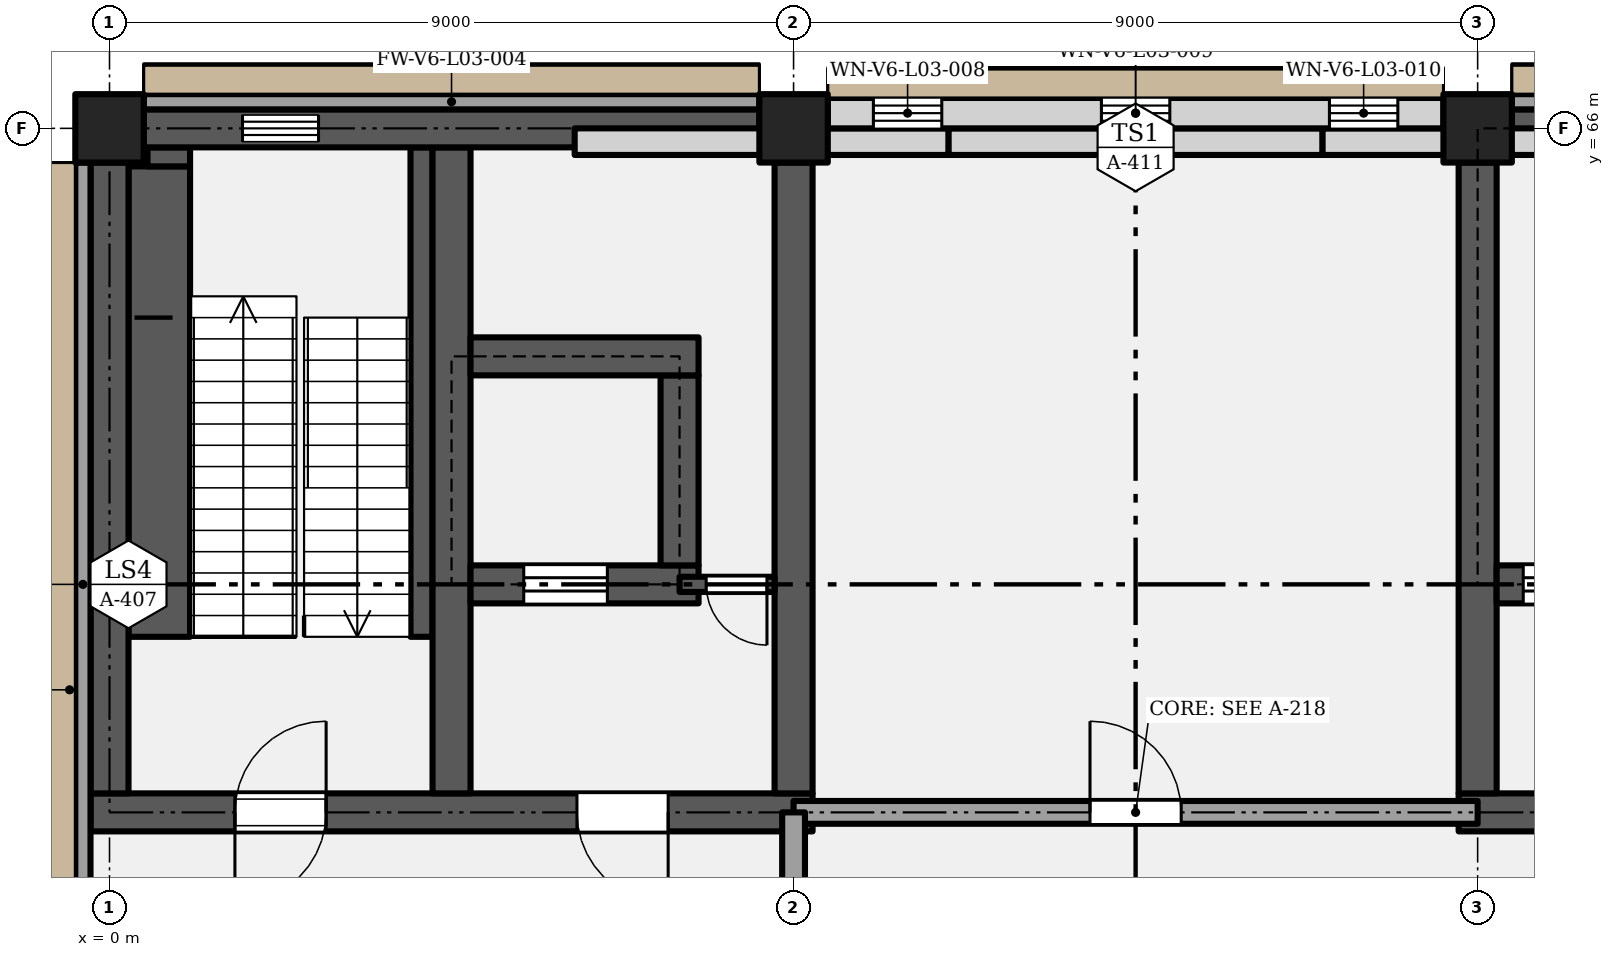
"""IFC4 building model, lengths in metres.
Left out: names, types, materials, properties, quantities, classifications, styles, units other than length and angle.
Written with IfcOpenShell. Run it as: python <this file> out.ifc"""

import sys

from ifc_helpers import new_model, si_unit, direction, frame, frame_2d, origin, origin_2d, place, context, subcontext, project, spatial, rectangle, extrude, element, fill, save


model = new_model("IFC4")
c1 = context("Model", 3, precision=1e-05, world=origin(), true_north=direction((0.0, 1.0)))
c2 = subcontext(c1, "Body", "Model", "MODEL_VIEW")
j1 = project(units=[si_unit("LENGTHUNIT", "METRE"), si_unit("PLANEANGLEUNIT", "RADIAN")], contexts=[c1])
p1 = place(None, origin())
s1 = spatial("IfcSite", under=j1, at=p1, CompositionType="ELEMENT")
p2 = place(p1, origin())
s2 = spatial("IfcBuilding", under=s1, at=p2, CompositionType="ELEMENT")
p3 = place(p2, frame((0.0, 0.0, 17.4)))
s3 = spatial("IfcBuildingStorey", under=s2, at=p3, CompositionType="ELEMENT", Elevation=17.4)
for number, where, z_axis, x_axis in (
    (1, (0.0, 66.0, 0.0), (0.0, 0.0, 1.0), (1.0, 0.0, 0.0)),
    (2, (9.0, 66.0, 0.0), (0.0, 0.0, 1.0), (1.0, 0.0, 0.0)),
    (3, (18.0, 66.0, 0.0), (0.0, 0.0, 1.0), (1.0, 0.0, 0.0)),
):
    element("IfcColumn", number, at=place(p3, frame(where, z_axis=z_axis, x_axis=x_axis)), inside=s3, PredefinedType="COLUMN", context=c2, shape_type="SweptSolid", body=[
        extrude(rectangle(XDim=0.9, YDim=0.9, at=origin_2d()), origin(), (0.0, 0.0, 1.0), 5.4),
    ])
p4 = place(p3, frame((-0.25, 57.0, 0.0), z_axis=(0.0, 0.0, 1.0), x_axis=(1.0, 0.0, 0.0)))
e4 = element("IfcWall", 4, at=p4, inside=s3, PredefinedType="SHEAR", context=c2, shape_type="SweptSolid", body=[
    extrude(rectangle(XDim=9.5, YDim=0.5, at=frame_2d((4.75, 0.0))), origin(), (0.0, 0.0, 1.0), 5.15),
])
p5 = place(p4, frame((1.9, 0.0, 0.0)))
e5 = element("IfcOpeningElement", 5, at=p5, cuts=e4, PredefinedType="OPENING", context=c2, shape_type="SweptSolid", body=[
    extrude(rectangle(XDim=1.2, YDim=2.1, at=frame_2d((0.6, 1.05))), frame((0.0, 0.26, 0.0), z_axis=(0.0, -1.0, 0.0), x_axis=(1.0, 0.0, 0.0)), (0.0, 0.0, 1.0), 0.52),
])
p6 = place(p4, frame((7.6, 0.0, 0.0), z_axis=(0.0, 0.0, 1.0), x_axis=(-1.0, 0.0, 0.0)))
e6 = element("IfcOpeningElement", 6, at=p6, cuts=e4, PredefinedType="OPENING", context=c2, shape_type="SweptSolid", body=[
    extrude(rectangle(XDim=1.2, YDim=2.1, at=frame_2d((0.6, 1.05))), frame((0.0, 0.26, 0.0), z_axis=(0.0, -1.0, 0.0), x_axis=(1.0, 0.0, 0.0)), (0.0, 0.0, 1.0), 0.52),
])
p7 = place(p3, frame((17.75, 57.0, 0.0), z_axis=(0.0, 0.0, 1.0), x_axis=(1.0, 0.0, 0.0)))
e7 = element("IfcWall", 7, at=p7, inside=s3, PredefinedType="SHEAR", context=c2, shape_type="SweptSolid", body=[
    extrude(rectangle(XDim=9.5, YDim=0.5, at=frame_2d((4.75, 0.0))), origin(), (0.0, 0.0, 1.0), 5.15),
])
p8 = place(p7, frame((3.1, 0.0, 0.0), z_axis=(0.0, 0.0, 1.0), x_axis=(-1.0, 0.0, 0.0)))
e8 = element("IfcOpeningElement", 8, at=p8, cuts=e7, PredefinedType="OPENING", context=c2, shape_type="SweptSolid", body=[
    extrude(rectangle(XDim=1.2, YDim=2.1, at=frame_2d((0.6, 1.05))), frame((0.0, 0.26, 0.0), z_axis=(0.0, -1.0, 0.0), x_axis=(1.0, 0.0, 0.0)), (0.0, 0.0, 1.0), 0.52),
])
p9 = place(p7, frame((6.4, 0.0, 0.0)))
e9 = element("IfcOpeningElement", 9, at=p9, cuts=e7, PredefinedType="OPENING", context=c2, shape_type="SweptSolid", body=[
    extrude(rectangle(XDim=1.2, YDim=2.1, at=frame_2d((0.6, 1.05))), frame((0.0, 0.26, 0.0), z_axis=(0.0, -1.0, 0.0), x_axis=(1.0, 0.0, 0.0)), (0.0, 0.0, 1.0), 0.52),
])
p10 = place(p3, frame((0.0, 57.25, 0.0), z_axis=(0.0, 0.0, 1.0), x_axis=(0.0, 1.0, 0.0)))
e10 = element("IfcWall", 10, at=p10, inside=s3, PredefinedType="SHEAR", context=c2, shape_type="SweptSolid", body=[
    extrude(rectangle(XDim=8.3, YDim=0.5, at=frame_2d((4.15, 0.0))), origin(), (0.0, 0.0, 1.0), 5.15),
])
p11 = place(p3, frame((4.5, 57.25, 0.0), z_axis=(0.0, 0.0, 1.0), x_axis=(0.0, 1.0, 0.0)))
e11 = element("IfcWall", 11, at=p11, inside=s3, PredefinedType="SHEAR", context=c2, shape_type="SweptSolid", body=[
    extrude(rectangle(XDim=8.5, YDim=0.5, at=frame_2d((4.25, 0.0))), origin(), (0.0, 0.0, 1.0), 5.15),
])
for number, where, z_axis, x_axis in (
    (12, (9.0, 57.25, 0.0), (0.0, 0.0, 1.0), (0.0, 1.0, 0.0)),
    (13, (18.0, 57.25, 0.0), (0.0, 0.0, 1.0), (0.0, 1.0, 0.0)),
):
    element("IfcWall", number, at=place(p3, frame(where, z_axis=z_axis, x_axis=x_axis)), inside=s3, PredefinedType="SHEAR", context=c2, shape_type="SweptSolid", body=[
        extrude(rectangle(XDim=8.3, YDim=0.5, at=frame_2d((4.15, 0.0))), origin(), (0.0, 0.0, 1.0), 5.15),
    ])
p12 = place(p3, frame((4.75, 60.0, 0.0), z_axis=(0.0, 0.0, 1.0), x_axis=(1.0, 0.0, 0.0)))
e14 = element("IfcWall", 14, at=p12, inside=s3, PredefinedType="SHEAR", context=c2, shape_type="SweptSolid", body=[
    extrude(rectangle(XDim=3.0, YDim=0.5, at=frame_2d((1.5, 0.0))), origin(), (0.0, 0.0, 1.0), 5.15),
])
p13 = place(p12, frame((0.7, 0.0, 0.0)))
e15 = element("IfcOpeningElement", 15, at=p13, cuts=e14, PredefinedType="OPENING", context=c2, shape_type="SweptSolid", body=[
    extrude(rectangle(XDim=1.1, YDim=2.1, at=frame_2d((0.55, 1.05))), frame((0.0, 0.26, 0.0), z_axis=(0.0, -1.0, 0.0), x_axis=(1.0, 0.0, 0.0)), (0.0, 0.0, 1.0), 0.52),
])
p14 = place(p3, frame((18.25, 60.0, 0.0), z_axis=(0.0, 0.0, 1.0), x_axis=(1.0, 0.0, 0.0)))
e16 = element("IfcWall", 16, at=p14, inside=s3, PredefinedType="SHEAR", context=c2, shape_type="SweptSolid", body=[
    extrude(rectangle(XDim=4.0, YDim=0.5, at=frame_2d((2.0, 0.0))), origin(), (0.0, 0.0, 1.0), 5.15),
])
p15 = place(p14, frame((0.35, 0.0, 0.0)))
e17 = element("IfcOpeningElement", 17, at=p15, cuts=e16, PredefinedType="OPENING", context=c2, shape_type="SweptSolid", body=[
    extrude(rectangle(XDim=1.1, YDim=2.1, at=frame_2d((0.55, 1.05))), frame((0.0, 0.26, 0.0), z_axis=(0.0, -1.0, 0.0), x_axis=(1.0, 0.0, 0.0)), (0.0, 0.0, 1.0), 0.52),
])
p16 = place(p14, frame((2.5, 0.0, 0.0)))
e18 = element("IfcOpeningElement", 18, at=p16, cuts=e16, PredefinedType="OPENING", context=c2, shape_type="SweptSolid", body=[
    extrude(rectangle(XDim=1.1, YDim=2.1, at=frame_2d((0.55, 1.05))), frame((0.0, 0.26, 0.0), z_axis=(0.0, -1.0, 0.0), x_axis=(1.0, 0.0, 0.0)), (0.0, 0.0, 1.0), 0.52),
])
p17 = place(p3, frame((7.5, 60.25, 0.0), z_axis=(0.0, 0.0, 1.0), x_axis=(0.0, 1.0, 0.0)))
e19 = element("IfcWall", 19, at=p17, inside=s3, PredefinedType="SHEAR", context=c2, shape_type="SweptSolid", body=[
    extrude(rectangle(XDim=2.5, YDim=0.5, at=frame_2d((1.25, 0.0))), origin(), (0.0, 0.0, 1.0), 5.15),
])
p18 = place(p3, frame((4.75, 63.0, 0.0), z_axis=(0.0, 0.0, 1.0), x_axis=(1.0, 0.0, 0.0)))
e20 = element("IfcWall", 20, at=p18, inside=s3, PredefinedType="SHEAR", context=c2, shape_type="SweptSolid", body=[
    extrude(rectangle(XDim=3.0, YDim=0.5, at=frame_2d((1.5, 0.0))), origin(), (0.0, 0.0, 1.0), 5.15),
])
for number, where, z_axis, x_axis in (
    (21, (0.45, 66.0, 0.0), (0.0, 0.0, 1.0), (1.0, 0.0, 0.0)),
    (22, (18.45, 66.0, 0.0), (0.0, 0.0, 1.0), (1.0, 0.0, 0.0)),
):
    element("IfcWall", number, at=place(p3, frame(where, z_axis=z_axis, x_axis=x_axis)), inside=s3, PredefinedType="SHEAR", context=c2, shape_type="SweptSolid", body=[
        extrude(rectangle(XDim=8.1, YDim=0.5, at=frame_2d((4.05, 0.0))), origin(), (0.0, 0.0, 1.0), 5.15),
    ])
p19 = place(p3, frame((0.45, 66.35, 0.0), z_axis=(0.0, 0.0, 1.0), x_axis=(1.0, 0.0, 0.0)))
e23 = element("IfcWall", 23, at=p19, inside=s3, PredefinedType="SOLIDWALL", context=c2, shape_type="SweptSolid", body=[
    extrude(rectangle(XDim=8.1, YDim=0.2, at=frame_2d((4.05, 0.0))), origin(), (0.0, 0.0, 1.0), 5.15),
])
p20 = place(p3, frame((9.45, 66.2, 0.0), z_axis=(0.0, 0.0, 1.0), x_axis=(1.0, 0.0, 0.0)))
e24 = element("IfcWall", 24, at=p20, inside=s3, PredefinedType="SOLIDWALL", context=c2, shape_type="SweptSolid", body=[
    extrude(rectangle(XDim=8.1, YDim=0.4, at=frame_2d((4.05, 0.0))), origin(), (0.0, 0.0, 1.0), 5.15),
])
p21 = place(p20, frame((0.6, 0.0, 1.5)))
e25 = element("IfcOpeningElement", 25, at=p21, cuts=e24, PredefinedType="OPENING", context=c2, shape_type="SweptSolid", body=[
    extrude(rectangle(XDim=0.9, YDim=1.8, at=frame_2d((0.45, 0.9))), frame((0.0, 0.21, 0.0), z_axis=(0.0, -1.0, 0.0), x_axis=(1.0, 0.0, 0.0)), (0.0, 0.0, 1.0), 0.42),
])
p22 = place(p20, frame((3.6, 0.0, 1.5)))
e26 = element("IfcOpeningElement", 26, at=p22, cuts=e24, PredefinedType="OPENING", context=c2, shape_type="SweptSolid", body=[
    extrude(rectangle(XDim=0.9, YDim=1.8, at=frame_2d((0.45, 0.9))), frame((0.0, 0.21, 0.0), z_axis=(0.0, -1.0, 0.0), x_axis=(1.0, 0.0, 0.0)), (0.0, 0.0, 1.0), 0.42),
])
p23 = place(p20, frame((6.6, 0.0, 1.5)))
e27 = element("IfcOpeningElement", 27, at=p23, cuts=e24, PredefinedType="OPENING", context=c2, shape_type="SweptSolid", body=[
    extrude(rectangle(XDim=0.9, YDim=1.8, at=frame_2d((0.45, 0.9))), frame((0.0, 0.21, 0.0), z_axis=(0.0, -1.0, 0.0), x_axis=(1.0, 0.0, 0.0)), (0.0, 0.0, 1.0), 0.42),
])
p24 = place(p3, frame((18.45, 66.35, 0.0), z_axis=(0.0, 0.0, 1.0), x_axis=(1.0, 0.0, 0.0)))
e28 = element("IfcWall", 28, at=p24, inside=s3, PredefinedType="SOLIDWALL", context=c2, shape_type="SweptSolid", body=[
    extrude(rectangle(XDim=8.1, YDim=0.2, at=frame_2d((4.05, 0.0))), origin(), (0.0, 0.0, 1.0), 5.15),
])
p25 = place(p3, frame((-0.35, 54.45, 0.0), z_axis=(0.0, 0.0, 1.0), x_axis=(0.0, 1.0, 0.0)))
e29 = element("IfcWall", 29, at=p25, inside=s3, PredefinedType="SOLIDWALL", context=c2, shape_type="SweptSolid", body=[
    extrude(rectangle(XDim=11.1, YDim=0.2, at=frame_2d((5.55, 0.0))), origin(), (0.0, 0.0, 1.0), 5.15),
])
p26 = place(p25, frame((0.45, 0.0, 0.9)))
e30 = element("IfcOpeningElement", 30, at=p26, cuts=e29, PredefinedType="OPENING", context=c2, shape_type="SweptSolid", body=[
    extrude(rectangle(XDim=1.2, YDim=2.4, at=frame_2d((0.6, 1.2))), frame((0.0, 0.11, 0.0), z_axis=(0.0, -1.0, 0.0), x_axis=(1.0, 0.0, 0.0)), (0.0, 0.0, 1.0), 0.22),
])
p27 = place(p3, frame((6.12, 65.825, 5.4), z_axis=(0.0, 0.0, 1.0), x_axis=(1.0, 0.0, 0.0)))
e31 = element("IfcWall", 31, at=p27, inside=s3, PredefinedType="PARAPET", context=c2, shape_type="SweptSolid", body=[
    extrude(rectangle(XDim=4.92, YDim=0.35, at=frame_2d((2.46, 0.0))), origin(), (0.0, 0.0, 1.0), 1.5),
])
p28 = place(p3, frame((11.04, 65.825, 5.4), z_axis=(0.0, 0.0, 1.0), x_axis=(1.0, 0.0, 0.0)))
e32 = element("IfcWall", 32, at=p28, inside=s3, PredefinedType="PARAPET", context=c2, shape_type="SweptSolid", body=[
    extrude(rectangle(XDim=4.92, YDim=0.35, at=frame_2d((2.46, 0.0))), origin(), (0.0, 0.0, 1.0), 1.8),
])
p29 = place(p3, frame((15.96, 65.825, 5.4), z_axis=(0.0, 0.0, 1.0), x_axis=(1.0, 0.0, 0.0)))
e33 = element("IfcWall", 33, at=p29, inside=s3, PredefinedType="PARAPET", context=c2, shape_type="SweptSolid", body=[
    extrude(rectangle(XDim=4.92, YDim=0.35, at=frame_2d((2.46, 0.0))), origin(), (0.0, 0.0, 1.0), 1.5),
])
p30 = place(p3, frame((-0.175, 57.0, 5.4), z_axis=(0.0, 0.0, 1.0), x_axis=(1.0, 0.0, 0.0)))
e34 = element("IfcWall", 34, at=p30, inside=s3, PredefinedType="SOLIDWALL", context=c2, shape_type="SweptSolid", body=[
    extrude(rectangle(XDim=4.85, YDim=0.35, at=frame_2d((2.425, 0.0))), origin(), (0.0, 0.0, 1.0), 3.1),
])
p31 = place(p30, frame((3.025, 0.0, 0.0), z_axis=(0.0, 0.0, 1.0), x_axis=(-1.0, 0.0, 0.0)))
e35 = element("IfcOpeningElement", 35, at=p31, cuts=e34, PredefinedType="OPENING", context=c2, shape_type="SweptSolid", body=[
    extrude(rectangle(XDim=1.2, YDim=2.1, at=frame_2d((0.6, 1.05))), frame((0.0, 0.185, 0.0), z_axis=(0.0, -1.0, 0.0), x_axis=(1.0, 0.0, 0.0)), (0.0, 0.0, 1.0), 0.37),
])
p32 = place(p3, frame((-0.175, 66.0, 5.4), z_axis=(0.0, 0.0, 1.0), x_axis=(1.0, 0.0, 0.0)))
e36 = element("IfcWall", 36, at=p32, inside=s3, PredefinedType="SOLIDWALL", context=c2, shape_type="SweptSolid", body=[
    extrude(rectangle(XDim=4.85, YDim=0.35, at=frame_2d((2.425, 0.0))), origin(), (0.0, 0.0, 1.0), 3.1),
])
p33 = place(p32, frame((1.925, 0.0, 2.4)))
e37 = element("IfcOpeningElement", 37, at=p33, cuts=e36, PredefinedType="OPENING", context=c2, shape_type="SweptSolid", body=[
    extrude(rectangle(XDim=1.0, YDim=0.5, at=frame_2d((0.5, 0.25))), frame((0.0, 0.185, 0.0), z_axis=(0.0, -1.0, 0.0), x_axis=(1.0, 0.0, 0.0)), (0.0, 0.0, 1.0), 0.37),
])
for number, where, z_axis, x_axis in (
    (38, (0.0, 57.175, 5.4), (0.0, 0.0, 1.0), (0.0, 1.0, 0.0)),
    (39, (4.5, 57.175, 5.4), (0.0, 0.0, 1.0), (0.0, 1.0, 0.0)),
):
    element("IfcWall", number, at=place(p3, frame(where, z_axis=z_axis, x_axis=x_axis)), inside=s3, PredefinedType="SOLIDWALL", context=c2, shape_type="SweptSolid", body=[
        extrude(rectangle(XDim=8.65, YDim=0.35, at=frame_2d((4.325, 0.0))), origin(), (0.0, 0.0, 1.0), 3.1),
    ])
p34 = place(p3, frame((9.0, 57.0, 0.0), z_axis=(0.0, 0.0, 1.0), x_axis=(1.0, 0.0, 0.0)))
e40 = element("IfcWall", 40, at=p34, inside=s3, PredefinedType="PARTITIONING", context=c2, shape_type="SweptSolid", body=[
    extrude(rectangle(XDim=9.0, YDim=0.3, at=frame_2d((4.5, 0.0))), origin(), (0.0, 0.0, 1.0), 5.15),
])
p35 = place(p34, frame((3.9, 0.0, 0.0)))
e41 = element("IfcOpeningElement", 41, at=p35, cuts=e40, PredefinedType="OPENING", context=c2, shape_type="SweptSolid", body=[
    extrude(rectangle(XDim=1.2, YDim=2.1, at=frame_2d((0.6, 1.05))), frame((0.0, 0.16, 0.0), z_axis=(0.0, -1.0, 0.0), x_axis=(1.0, 0.0, 0.0)), (0.0, 0.0, 1.0), 0.32),
])
p36 = place(p3, frame((7.5, 60.0, 0.0), z_axis=(0.0, 0.0, 1.0), x_axis=(1.0, 0.0, 0.0)))
e42 = element("IfcWall", 42, at=p36, inside=s3, PredefinedType="SHEAR", context=c2, shape_type="SweptSolid", body=[
    extrude(rectangle(XDim=1.25, YDim=0.2, at=frame_2d((0.625, 0.0))), origin(), (0.0, 0.0, 1.0), 5.15),
])
p37 = place(p36, frame((1.15, 0.0, 0.0), z_axis=(0.0, 0.0, 1.0), x_axis=(-1.0, 0.0, 0.0)))
e43 = element("IfcOpeningElement", 43, at=p37, cuts=e42, PredefinedType="OPENING", context=c2, shape_type="SweptSolid", body=[
    extrude(rectangle(XDim=0.8, YDim=2.0, at=frame_2d((0.4, 1.0))), frame((0.0, 0.11, 0.0), z_axis=(0.0, -1.0, 0.0), x_axis=(1.0, 0.0, 0.0)), (0.0, 0.0, 1.0), 0.22),
])
p38 = place(p3, frame((9.0, 54.5, 0.0), z_axis=(0.0, 0.0, 1.0), x_axis=(0.0, 1.0, 0.0)))
e44 = element("IfcWall", 44, at=p38, inside=s3, PredefinedType="PARTITIONING", context=c2, shape_type="SweptSolid", body=[
    extrude(rectangle(XDim=2.5, YDim=0.3, at=frame_2d((1.25, 0.0))), origin(), (0.0, 0.0, 1.0), 4.4),
])
p39 = place(p3, frame((0.655, 59.31, 0.0), z_axis=(0.0, 0.0, 1.0), x_axis=(0.0, 1.0, 0.0)))
e45 = element("IfcWall", 45, at=p39, inside=s3, PredefinedType="SHEAR", context=c2, shape_type="SweptSolid", body=[
    extrude(rectangle(XDim=6.19, YDim=0.81, at=frame_2d((3.095, 0.0))), origin(), (0.0, 0.0, 1.0), 2.587),
])
p40 = place(p3, frame((0.78, 65.5, 0.0), z_axis=(0.0, 0.0, 1.0), x_axis=(0.0, 1.0, 0.0)))
e46 = element("IfcWall", 46, at=p40, inside=s3, PredefinedType="SHEAR", context=c2, shape_type="SweptSolid", body=[
    extrude(rectangle(XDim=0.25, YDim=0.56, at=frame_2d((0.125, 0.0))), origin(), (0.0, 0.0, 1.0), 2.587),
])
p41 = place(p3, frame((4.105, 59.31, 0.0), z_axis=(0.0, 0.0, 1.0), x_axis=(0.0, 1.0, 0.0)))
e47 = element("IfcWall", 47, at=p41, inside=s3, PredefinedType="SHEAR", context=c2, shape_type="SweptSolid", body=[
    extrude(rectangle(XDim=6.44, YDim=0.29, at=frame_2d((3.22, 0.0))), origin(), (0.0, 0.0, 1.0), 2.587),
])
p42 = place(p21, origin())
e48 = element("IfcWindow", 48, at=p42, inside=s3, PartitioningType="SINGLE_PANEL", PredefinedType="WINDOW", context=c2, shape_type="SweptSolid", body=[
    extrude(rectangle(XDim=0.9, YDim=1.8, at=frame_2d((0.45, 0.9))), frame((0.0, 0.03, 0.0), z_axis=(0.0, -1.0, 0.0), x_axis=(1.0, 0.0, 0.0)), (0.0, 0.0, 1.0), 0.06),
])
fill(e25, e48)
p43 = place(p22, origin())
e49 = element("IfcWindow", 49, at=p43, inside=s3, PartitioningType="SINGLE_PANEL", PredefinedType="WINDOW", context=c2, shape_type="SweptSolid", body=[
    extrude(rectangle(XDim=0.9, YDim=1.8, at=frame_2d((0.45, 0.9))), frame((0.0, 0.03, 0.0), z_axis=(0.0, -1.0, 0.0), x_axis=(1.0, 0.0, 0.0)), (0.0, 0.0, 1.0), 0.06),
])
fill(e26, e49)
p44 = place(p23, origin())
e50 = element("IfcWindow", 50, at=p44, inside=s3, PartitioningType="SINGLE_PANEL", PredefinedType="WINDOW", context=c2, shape_type="SweptSolid", body=[
    extrude(rectangle(XDim=0.9, YDim=1.8, at=frame_2d((0.45, 0.9))), frame((0.0, 0.03, 0.0), z_axis=(0.0, -1.0, 0.0), x_axis=(1.0, 0.0, 0.0)), (0.0, 0.0, 1.0), 0.06),
])
fill(e27, e50)
p45 = place(p31, origin())
e51 = element("IfcDoor", 51, at=p45, inside=s3, OperationType="SINGLE_SWING_LEFT", PredefinedType="DOOR", context=c2, shape_type="SweptSolid", body=[
    extrude(rectangle(XDim=1.2, YDim=2.1, at=frame_2d((0.6, 1.05))), frame((0.0, 0.025, 0.0), z_axis=(0.0, -1.0, 0.0), x_axis=(1.0, 0.0, 0.0)), (0.0, 0.0, 1.0), 0.05),
])
fill(e35, e51)
p46 = place(p33, origin())
e52 = element("IfcWindow", 52, at=p46, inside=s3, PartitioningType="SINGLE_PANEL", PredefinedType="WINDOW", context=c2, shape_type="SweptSolid", body=[
    extrude(rectangle(XDim=1.0, YDim=0.5, at=frame_2d((0.5, 0.25))), frame((0.0, 0.03, 0.0), z_axis=(0.0, -1.0, 0.0), x_axis=(1.0, 0.0, 0.0)), (0.0, 0.0, 1.0), 0.06),
])
fill(e37, e52)
p47 = place(p5, origin())
e53 = element("IfcDoor", 53, at=p47, inside=s3, OperationType="SINGLE_SWING_RIGHT", PredefinedType="DOOR", context=c2, shape_type="SweptSolid", body=[
    extrude(rectangle(XDim=1.2, YDim=2.1, at=frame_2d((0.6, 1.05))), frame((0.0, 0.025, 0.0), z_axis=(0.0, -1.0, 0.0), x_axis=(1.0, 0.0, 0.0)), (0.0, 0.0, 1.0), 0.05),
])
fill(e5, e53)
p48 = place(p6, origin())
e54 = element("IfcDoor", 54, at=p48, inside=s3, OperationType="SINGLE_SWING_LEFT", PredefinedType="DOOR", context=c2, shape_type="SweptSolid", body=[
    extrude(rectangle(XDim=1.2, YDim=2.1, at=frame_2d((0.6, 1.05))), frame((0.0, 0.025, 0.0), z_axis=(0.0, -1.0, 0.0), x_axis=(1.0, 0.0, 0.0)), (0.0, 0.0, 1.0), 0.05),
])
fill(e6, e54)
p49 = place(p13, origin())
e55 = element("IfcDoor", 55, at=p49, inside=s3, OperationType="SLIDING_TO_LEFT", PredefinedType="DOOR", context=c2, shape_type="SweptSolid", body=[
    extrude(rectangle(XDim=1.1, YDim=2.1, at=frame_2d((0.55, 1.05))), frame((0.0, 0.025, 0.0), z_axis=(0.0, -1.0, 0.0), x_axis=(1.0, 0.0, 0.0)), (0.0, 0.0, 1.0), 0.05),
])
fill(e15, e55)
p50 = place(p37, origin())
e56 = element("IfcDoor", 56, at=p50, inside=s3, OperationType="SINGLE_SWING_LEFT", PredefinedType="DOOR", context=c2, shape_type="SweptSolid", body=[
    extrude(rectangle(XDim=0.8, YDim=2.0, at=frame_2d((0.4, 1.0))), frame((0.0, 0.025, 0.0), z_axis=(0.0, -1.0, 0.0), x_axis=(1.0, 0.0, 0.0)), (0.0, 0.0, 1.0), 0.05),
])
fill(e43, e56)
p51 = place(p15, origin())
e57 = element("IfcDoor", 57, at=p51, inside=s3, OperationType="SLIDING_TO_LEFT", PredefinedType="DOOR", context=c2, shape_type="SweptSolid", body=[
    extrude(rectangle(XDim=1.1, YDim=2.1, at=frame_2d((0.55, 1.05))), frame((0.0, 0.025, 0.0), z_axis=(0.0, -1.0, 0.0), x_axis=(1.0, 0.0, 0.0)), (0.0, 0.0, 1.0), 0.05),
])
fill(e17, e57)
p52 = place(p35, origin())
e58 = element("IfcDoor", 58, at=p52, inside=s3, OperationType="SINGLE_SWING_LEFT", PredefinedType="DOOR", context=c2, shape_type="SweptSolid", body=[
    extrude(rectangle(XDim=1.2, YDim=2.1, at=frame_2d((0.6, 1.05))), frame((0.0, 0.025, 0.0), z_axis=(0.0, -1.0, 0.0), x_axis=(1.0, 0.0, 0.0)), (0.0, 0.0, 1.0), 0.05),
])
fill(e41, e58)
save(model, sys.argv[1])
